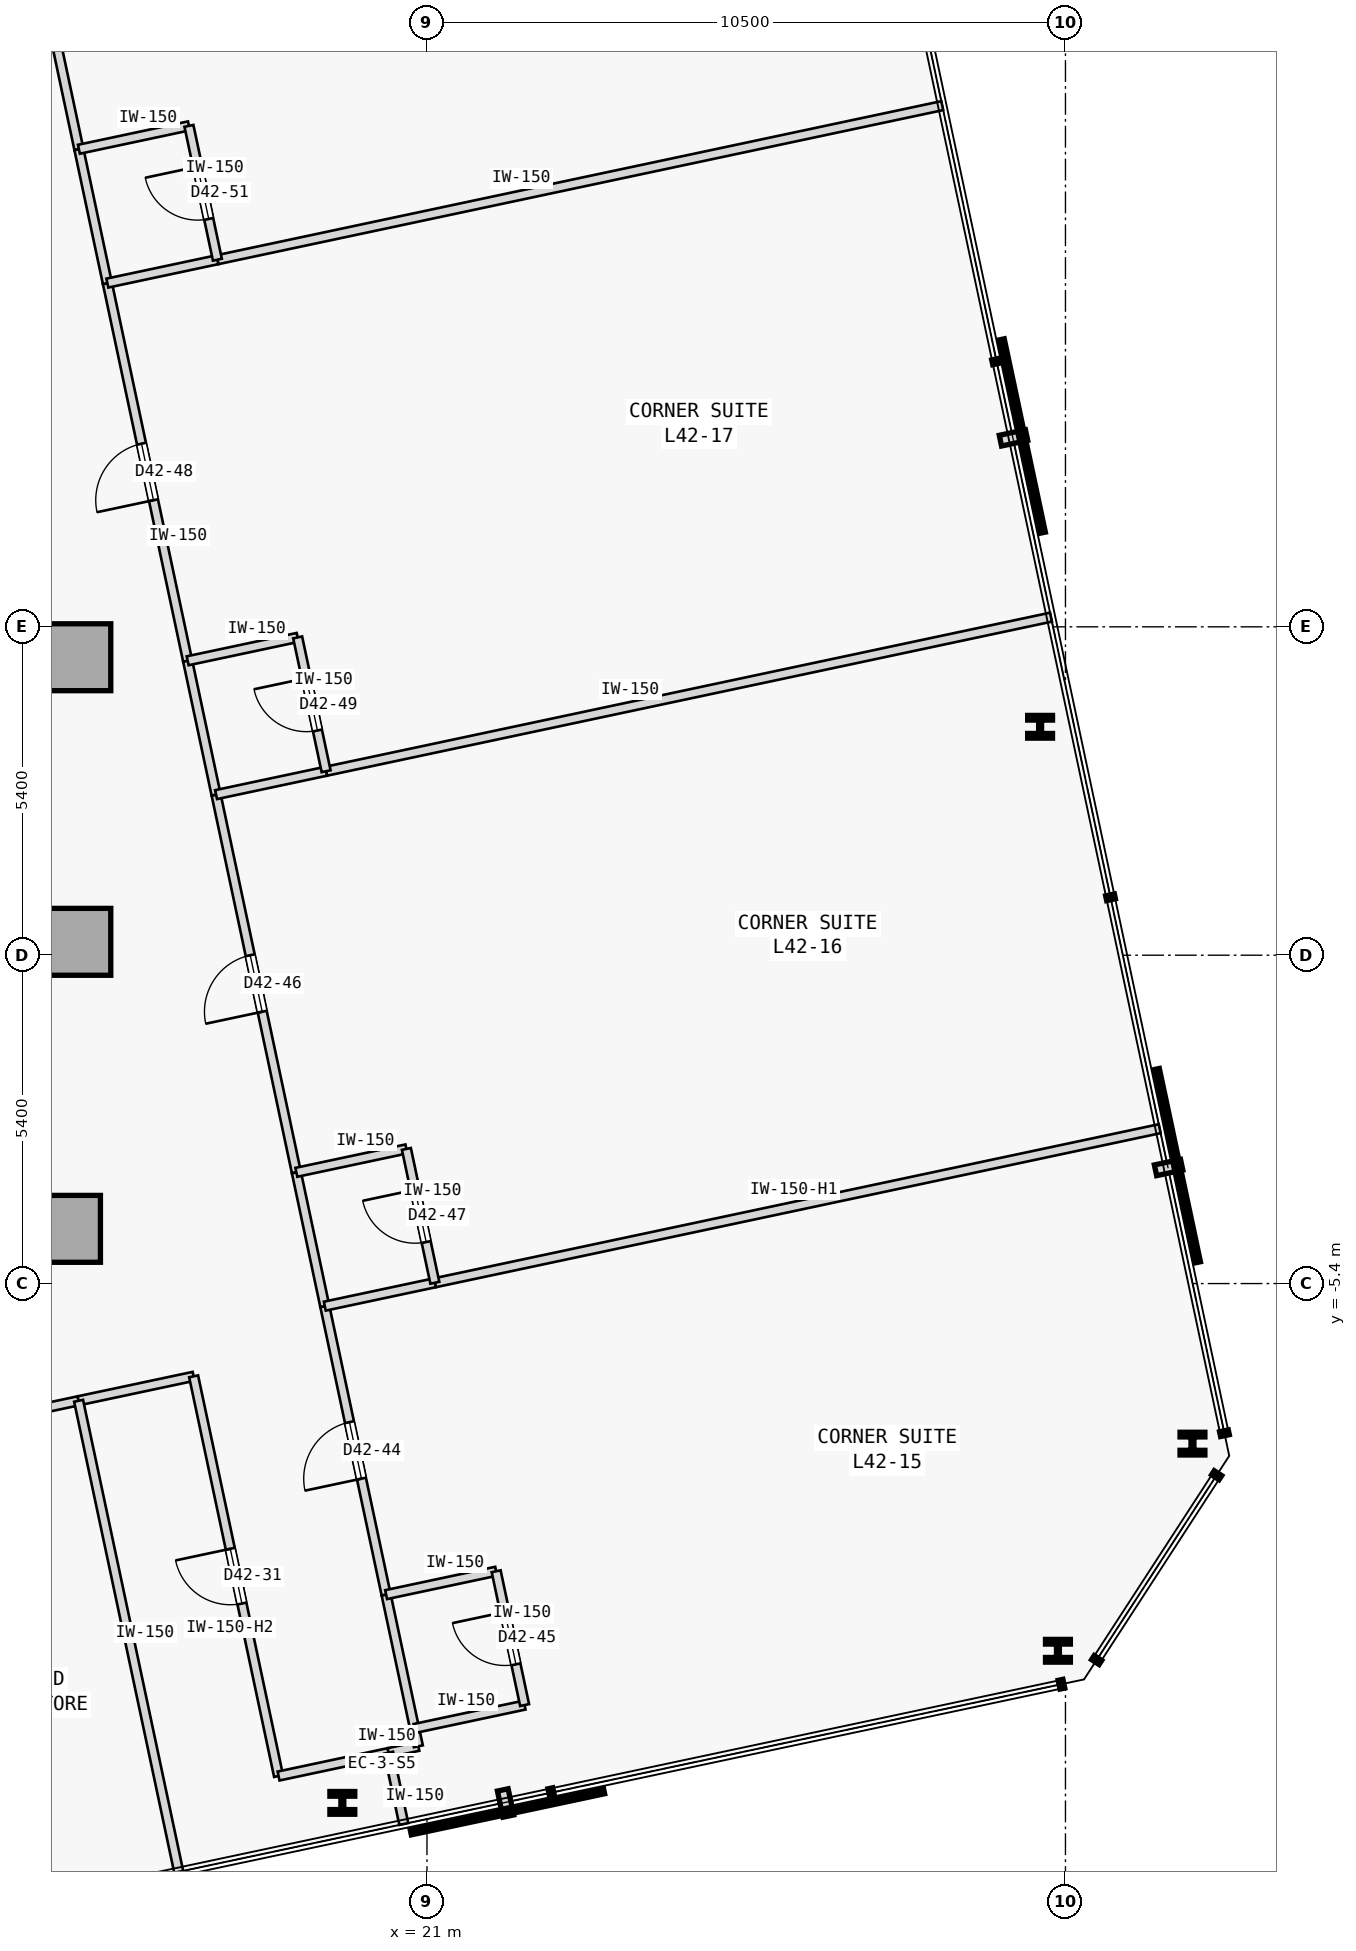
"""IFC4 building model, lengths in metres.
Left out: names, types, materials, properties, quantities, classifications, styles, units other than length and angle.
Written with IfcOpenShell. Run it as: python <this file> out.ifc"""

import sys

from ifc_helpers import new_model, si_unit, direction, frame, frame_2d, origin, origin_2d, place, context, subcontext, project, spatial, rectangle, i_section, extrude, element, fill, save


model = new_model("IFC4")
c1 = context("Model", 3, precision=1e-05, world=origin(), true_north=direction((0.0, 1.0)))
c2 = subcontext(c1, "Body", "Model", "MODEL_VIEW")
j1 = project(units=[si_unit("LENGTHUNIT", "METRE"), si_unit("PLANEANGLEUNIT", "RADIAN")], contexts=[c1])
p1 = place(None, origin())
s1 = spatial("IfcSite", under=j1, at=p1, CompositionType="ELEMENT")
p2 = place(p1, origin())
s2 = spatial("IfcBuilding", under=s1, at=p2, CompositionType="ELEMENT")
p3 = place(p2, frame((0.0, 0.0, 165.0)))
s3 = spatial("IfcBuildingStorey", under=s2, at=p3, CompositionType="ELEMENT", Elevation=165.0)
for number, where, z_axis, x_axis in (
    (1, (15.25, 4.9, 0.0), (0.0, 0.0, 1.0), (1.0, 0.0, 0.0)),
    (2, (15.25, 0.22, 0.0), (0.0, 0.0, 1.0), (1.0, 0.0, 0.0)),
    (3, (15.08, -4.5, 0.0), (0.0, 0.0, 1.0), (1.0, 0.0, 0.0)),
):
    element("IfcColumn", number, at=place(p3, frame(where, z_axis=z_axis, x_axis=x_axis)), inside=s3, PredefinedType="COLUMN", context=c2, shape_type="SweptSolid", body=[
        extrude(rectangle(XDim=1.1, YDim=1.1, at=origin_2d()), origin(), (0.0, 0.0, 1.0), 3.4),
    ])
for number, where, z_axis, x_axis in (
    (4, (19.608, -13.94, 0.0), (0.0, 0.0, 1.0), (1.0, 0.0, 0.0)),
    (5, (31.376, -11.439, 0.0), (0.0, 0.0, 1.0), (1.0, 0.0, 0.0)),
    (6, (33.589, -8.032, 0.0), (0.0, 0.0, 1.0), (1.0, 0.0, 0.0)),
    (7, (31.083, 3.756, 0.0), (0.0, 0.0, 1.0), (1.0, 0.0, 0.0)),
):
    element("IfcColumn", number, at=place(p3, frame(where, z_axis=z_axis, x_axis=x_axis)), inside=s3, PredefinedType="COLUMN", context=c2, shape_type="SweptSolid", body=[
        extrude(i_section(OverallWidth=0.409, OverallDepth=0.374, WebThickness=0.048, FlangeThickness=0.077, FilletRadius=0.015, at=origin_2d()), origin(), (0.0, 0.0, 1.0), 3.4),
    ])
p4 = place(p3, frame((11.234, -8.185, 0.0), z_axis=(0.0, 0.0, 1.0), x_axis=(0.978155092113, 0.207876443525, 0.0)))
e8 = element("IfcWall", 8, at=p4, inside=s3, PredefinedType="PARTITIONING", context=c2, shape_type="SweptSolid", body=[
    extrude(rectangle(XDim=4.127, YDim=0.15, at=frame_2d((2.063, 0.0))), origin(), (0.0, 0.0, 1.0), 3.175),
])
p5 = place(p4, frame((1.604, 0.0, 0.0)))
e9 = element("IfcOpeningElement", 9, at=p5, cuts=e8, PredefinedType="OPENING", context=c2, shape_type="SweptSolid", body=[
    extrude(rectangle(XDim=0.92, YDim=2.15, at=frame_2d((0.46, 1.075))), frame((0.0, 0.085, 0.0), z_axis=(0.0, -1.0, 0.0), x_axis=(1.0, 0.0, 0.0)), (0.0, 0.0, 1.0), 0.17),
])
p6 = place(p3, frame((15.271, -7.327, 0.0), z_axis=(0.0, 0.0, 1.0), x_axis=(0.978150188204, 0.207899517354, 0.0)))
e10 = element("IfcWall", 10, at=p6, inside=s3, PredefinedType="PARTITIONING", context=c2, shape_type="SweptSolid", body=[
    extrude(rectangle(XDim=1.934, YDim=0.15, at=frame_2d((0.967, 0.0))), origin(), (0.0, 0.0, 1.0), 3.175),
])
p7 = place(p3, frame((18.56, -13.498, 0.0), z_axis=(0.0, 0.0, 1.0), x_axis=(-0.207888737749, 0.978152479278, 0.0)))
e11 = element("IfcWall", 11, at=p7, inside=s3, PredefinedType="PARTITIONING", context=c2, shape_type="SweptSolid", body=[
    extrude(rectangle(XDim=6.72, YDim=0.15, at=frame_2d((3.36, 0.0))), origin(), (0.0, 0.0, 1.0), 2.575),
])
p8 = place(p7, frame((2.9, 0.0, 0.0)))
e12 = element("IfcOpeningElement", 12, at=p8, cuts=e11, PredefinedType="OPENING", context=c2, shape_type="SweptSolid", body=[
    extrude(rectangle(XDim=0.92, YDim=2.15, at=frame_2d((0.46, 1.075))), frame((0.0, 0.085, 0.0), z_axis=(0.0, -1.0, 0.0), x_axis=(1.0, 0.0, 0.0)), (0.0, 0.0, 1.0), 0.17),
])
p9 = place(p3, frame((18.56, -13.498, 0.0), z_axis=(0.0, 0.0, 1.0), x_axis=(0.978160192495, 0.207852442415, 0.0)))
e13 = element("IfcWall", 13, at=p9, inside=s3, PredefinedType="PARTITIONING", context=c2, shape_type="SweptSolid", body=[
    extrude(rectangle(XDim=1.85, YDim=0.15, at=frame_2d((0.925, 0.0))), origin(), (0.0, 0.0, 1.0), 3.175),
])
p10 = place(p3, frame((20.369, -13.114, 0.0), z_axis=(0.0, 0.0, 1.0), x_axis=(0.978143962546, 0.207928806409, 0.0)))
e14 = element("IfcWall", 14, at=p10, inside=s3, PredefinedType="PARTITIONING", context=c2, shape_type="SweptSolid", body=[
    extrude(rectangle(XDim=0.5, YDim=0.15, at=frame_2d((0.25, 0.0))), origin(), (0.0, 0.0, 1.0), 3.175),
])
p11 = place(p3, frame((20.858, -13.01, 0.0), z_axis=(0.0, 0.0, 1.0), x_axis=(-0.208306395052, 0.978063620518, 0.0)))
e15 = element("IfcWall", 15, at=p11, inside=s3, PredefinedType="PARTITIONING", context=c2, shape_type="SweptSolid", body=[
    extrude(rectangle(XDim=0.3, YDim=0.15, at=frame_2d((0.15, 0.0))), origin(), (0.0, 0.0, 1.0), 3.175),
])
p12 = place(p3, frame((20.328, -10.515, 0.0), z_axis=(0.0, 0.0, 1.0), x_axis=(-0.207950868925, 0.97813927235, 0.0)))
e16 = element("IfcWall", 16, at=p12, inside=s3, PredefinedType="PARTITIONING", context=c2, shape_type="SweptSolid", body=[
    extrude(rectangle(XDim=4.85, YDim=0.15, at=frame_2d((2.425, 0.0))), origin(), (0.0, 0.0, 1.0), 3.175),
])
p13 = place(p12, frame((1.95, 0.0, 0.0)))
e17 = element("IfcOpeningElement", 17, at=p13, cuts=e16, PredefinedType="OPENING", context=c2, shape_type="SweptSolid", body=[
    extrude(rectangle(XDim=0.95, YDim=2.15, at=frame_2d((0.475, 1.075))), frame((0.0, 0.085, 0.0), z_axis=(0.0, -1.0, 0.0), x_axis=(1.0, 0.0, 0.0)), (0.0, 0.0, 1.0), 0.17),
])
p14 = place(p3, frame((20.796, -12.716, 0.0), z_axis=(0.0, 0.0, 1.0), x_axis=(-0.207891197838, 0.978151956427, 0.0)))
e18 = element("IfcWall", 18, at=p14, inside=s3, PredefinedType="PARTITIONING", context=c2, shape_type="SweptSolid", body=[
    extrude(rectangle(XDim=2.25, YDim=0.15, at=frame_2d((1.125, 0.0))), origin(), (0.0, 0.0, 1.0), 3.175),
])
p15 = place(p3, frame((18.852, -3.571, 0.0), z_axis=(0.0, 0.0, 1.0), x_axis=(-0.207879907349, 0.978154355979, 0.0)))
e19 = element("IfcWall", 19, at=p15, inside=s3, PredefinedType="PARTITIONING", context=c2, shape_type="SweptSolid", body=[
    extrude(rectangle(XDim=6.35, YDim=0.15, at=frame_2d((3.175, 0.0))), origin(), (0.0, 0.0, 1.0), 3.175),
])
p16 = place(p15, frame((2.7, 0.0, 0.0)))
e20 = element("IfcOpeningElement", 20, at=p16, cuts=e19, PredefinedType="OPENING", context=c2, shape_type="SweptSolid", body=[
    extrude(rectangle(XDim=0.95, YDim=2.15, at=frame_2d((0.475, 1.075))), frame((0.0, 0.085, 0.0), z_axis=(0.0, -1.0, 0.0), x_axis=(1.0, 0.0, 0.0)), (0.0, 0.0, 1.0), 0.17),
])
p17 = place(p3, frame((19.32, -5.771, 0.0), z_axis=(0.0, 0.0, 1.0), x_axis=(-0.207913264065, 0.978147266328, 0.0)))
e21 = element("IfcWall", 21, at=p17, inside=s3, PredefinedType="PARTITIONING", context=c2, shape_type="SweptSolid", body=[
    extrude(rectangle(XDim=2.25, YDim=0.15, at=frame_2d((1.125, 0.0))), origin(), (0.0, 0.0, 1.0), 3.175),
])
p18 = place(p3, frame((17.064, 4.841, 0.0), z_axis=(0.0, 0.0, 1.0), x_axis=(-0.207924511115, 0.978144875608, 0.0)))
e22 = element("IfcWall", 22, at=p18, inside=s3, PredefinedType="PARTITIONING", context=c2, shape_type="SweptSolid", body=[
    extrude(rectangle(XDim=6.35, YDim=0.15, at=frame_2d((3.175, 0.0))), origin(), (0.0, 0.0, 1.0), 3.175),
])
p19 = place(p18, frame((2.7, 0.0, 0.0)))
e23 = element("IfcOpeningElement", 23, at=p19, cuts=e22, PredefinedType="OPENING", context=c2, shape_type="SweptSolid", body=[
    extrude(rectangle(XDim=0.95, YDim=2.15, at=frame_2d((0.475, 1.075))), frame((0.0, 0.085, 0.0), z_axis=(0.0, -1.0, 0.0), x_axis=(1.0, 0.0, 0.0)), (0.0, 0.0, 1.0), 0.17),
])
p20 = place(p3, frame((17.532, 2.641, 0.0), z_axis=(0.0, 0.0, 1.0), x_axis=(-0.207913264065, 0.978147266328, 0.0)))
e24 = element("IfcWall", 24, at=p20, inside=s3, PredefinedType="PARTITIONING", context=c2, shape_type="SweptSolid", body=[
    extrude(rectangle(XDim=2.25, YDim=0.15, at=frame_2d((1.125, 0.0))), origin(), (0.0, 0.0, 1.0), 3.175),
])
p21 = place(p3, frame((15.276, 13.253, 0.0), z_axis=(0.0, 0.0, 1.0), x_axis=(-0.207924511115, 0.978144875608, 0.0)))
e25 = element("IfcWall", 25, at=p21, inside=s3, PredefinedType="PARTITIONING", context=c2, shape_type="SweptSolid", body=[
    extrude(rectangle(XDim=6.35, YDim=0.15, at=frame_2d((3.175, 0.0))), origin(), (0.0, 0.0, 1.0), 3.175),
])
p22 = place(p21, frame((2.7, 0.0, 0.0)))
e26 = element("IfcOpeningElement", 26, at=p22, cuts=e25, PredefinedType="OPENING", context=c2, shape_type="SweptSolid", body=[
    extrude(rectangle(XDim=0.95, YDim=2.15, at=frame_2d((0.475, 1.075))), frame((0.0, 0.085, 0.0), z_axis=(0.0, -1.0, 0.0), x_axis=(1.0, 0.0, 0.0)), (0.0, 0.0, 1.0), 0.17),
])
p23 = place(p3, frame((15.744, 11.052, 0.0), z_axis=(0.0, 0.0, 1.0), x_axis=(-0.207891197838, 0.978151956427, 0.0)))
e27 = element("IfcWall", 27, at=p23, inside=s3, PredefinedType="PARTITIONING", context=c2, shape_type="SweptSolid", body=[
    extrude(rectangle(XDim=2.25, YDim=0.15, at=frame_2d((1.125, 0.0))), origin(), (0.0, 0.0, 1.0), 3.175),
])
p24 = place(p3, frame((16.917, -15.074, 0.0), z_axis=(0.0, 0.0, 1.0), x_axis=(-0.207922536845, 0.978145295277, 0.0)))
e28 = element("IfcWall", 28, at=p24, inside=s3, PredefinedType="PARTITIONING", context=c2, shape_type="SweptSolid", body=[
    extrude(rectangle(XDim=7.92, YDim=0.15, at=frame_2d((3.96, 0.0))), origin(), (0.0, 0.0, 1.0), 3.175),
])
p25 = place(p3, frame((20.619, -14.288, 0.0), z_axis=(0.0, 0.0, 1.0), x_axis=(-0.207917150959, 0.978146440129, 0.0)))
e29 = element("IfcWall", 29, at=p25, inside=s3, PredefinedType="PARTITIONING", context=c2, shape_type="SweptSolid", body=[
    extrude(rectangle(XDim=1.2, YDim=0.15, at=frame_2d((0.6, 0.0))), origin(), (0.0, 0.0, 1.0), 3.175),
])
for number, where, z_axis, x_axis in (
    (30, (20.796, -12.716, 0.0), (0.0, 0.0, 1.0), (0.978, 0.208, 0.0)),
    (31, (20.328, -10.515, 0.0), (0.0, 0.0, 1.0), (0.978, 0.208, 0.0)),
):
    element("IfcWall", number, at=place(p3, frame(where, z_axis=z_axis, x_axis=x_axis)), inside=s3, PredefinedType="PARTITIONING", context=c2, shape_type="SweptSolid", body=[
        extrude(rectangle(XDim=1.85, YDim=0.15, at=frame_2d((0.925, 0.0))), origin(), (0.0, 0.0, 1.0), 3.175),
    ])
p26 = place(p3, frame((22.605, -12.332, 0.0), z_axis=(0.0, 0.0, 1.0), x_axis=(-0.207891197838, 0.978151956427, 0.0)))
e32 = element("IfcWall", 32, at=p26, inside=s3, PredefinedType="PARTITIONING", context=c2, shape_type="SweptSolid", body=[
    extrude(rectangle(XDim=2.25, YDim=0.15, at=frame_2d((1.125, 0.0))), origin(), (0.0, 0.0, 1.0), 3.175),
])
p27 = place(p26, frame((0.685, 0.0, 0.0)))
e33 = element("IfcOpeningElement", 33, at=p27, cuts=e32, PredefinedType="OPENING", context=c2, shape_type="SweptSolid", body=[
    extrude(rectangle(XDim=0.88, YDim=2.15, at=frame_2d((0.44, 1.075))), frame((0.0, 0.085, 0.0), z_axis=(0.0, -1.0, 0.0), x_axis=(1.0, 0.0, 0.0)), (0.0, 0.0, 1.0), 0.17),
])
p28 = place(p3, frame((21.129, -5.387, 0.0), z_axis=(0.0, 0.0, 1.0), x_axis=(0.97814556055, 0.207921288896, 0.0)))
e34 = element("IfcWall", 34, at=p28, inside=s3, PredefinedType="PARTITIONING", context=c2, shape_type="SweptSolid", body=[
    extrude(rectangle(XDim=12.187, YDim=0.15, at=frame_2d((6.094, 0.0))), origin(), (0.0, 0.0, 1.0), 2.725),
])
p29 = place(p3, frame((19.32, -5.771, 0.0), z_axis=(0.0, 0.0, 1.0), x_axis=(0.978165892835, 0.207825614625, 0.0)))
e35 = element("IfcWall", 35, at=p29, inside=s3, PredefinedType="PARTITIONING", context=c2, shape_type="SweptSolid", body=[
    extrude(rectangle(XDim=1.85, YDim=0.15, at=frame_2d((0.925, 0.0))), origin(), (0.0, 0.0, 1.0), 3.175),
])
p30 = place(p3, frame((18.852, -3.571, 0.0), z_axis=(0.0, 0.0, 1.0), x_axis=(0.978139061018, 0.207951862966, 0.0)))
e36 = element("IfcWall", 36, at=p30, inside=s3, PredefinedType="PARTITIONING", context=c2, shape_type="SweptSolid", body=[
    extrude(rectangle(XDim=1.85, YDim=0.15, at=frame_2d((0.925, 0.0))), origin(), (0.0, 0.0, 1.0), 3.175),
])
p31 = place(p3, frame((21.129, -5.387, 0.0), z_axis=(0.0, 0.0, 1.0), x_axis=(-0.207891197838, 0.978151956427, 0.0)))
e37 = element("IfcWall", 37, at=p31, inside=s3, PredefinedType="PARTITIONING", context=c2, shape_type="SweptSolid", body=[
    extrude(rectangle(XDim=2.25, YDim=0.15, at=frame_2d((1.125, 0.0))), origin(), (0.0, 0.0, 1.0), 3.175),
])
p32 = place(p31, frame((0.685, 0.0, 0.0)))
e38 = element("IfcOpeningElement", 38, at=p32, cuts=e37, PredefinedType="OPENING", context=c2, shape_type="SweptSolid", body=[
    extrude(rectangle(XDim=0.88, YDim=2.15, at=frame_2d((0.44, 1.075))), frame((0.0, 0.085, 0.0), z_axis=(0.0, -1.0, 0.0), x_axis=(1.0, 0.0, 0.0)), (0.0, 0.0, 1.0), 0.17),
])
p33 = place(p3, frame((19.341, 3.025, 0.0), z_axis=(0.0, 0.0, 1.0), x_axis=(0.97814556055, 0.207921288896, 0.0)))
e39 = element("IfcWall", 39, at=p33, inside=s3, PredefinedType="PARTITIONING", context=c2, shape_type="SweptSolid", body=[
    extrude(rectangle(XDim=12.187, YDim=0.15, at=frame_2d((6.094, 0.0))), origin(), (0.0, 0.0, 1.0), 3.175),
])
p34 = place(p3, frame((17.532, 2.641, 0.0), z_axis=(0.0, 0.0, 1.0), x_axis=(0.978160192495, 0.207852442415, 0.0)))
e40 = element("IfcWall", 40, at=p34, inside=s3, PredefinedType="PARTITIONING", context=c2, shape_type="SweptSolid", body=[
    extrude(rectangle(XDim=1.85, YDim=0.15, at=frame_2d((0.925, 0.0))), origin(), (0.0, 0.0, 1.0), 3.175),
])
p35 = place(p3, frame((17.064, 4.841, 0.0), z_axis=(0.0, 0.0, 1.0), x_axis=(0.978133353907, 0.20797870558, 0.0)))
e41 = element("IfcWall", 41, at=p35, inside=s3, PredefinedType="PARTITIONING", context=c2, shape_type="SweptSolid", body=[
    extrude(rectangle(XDim=1.85, YDim=0.15, at=frame_2d((0.925, 0.0))), origin(), (0.0, 0.0, 1.0), 3.175),
])
p36 = place(p3, frame((19.341, 3.025, 0.0), z_axis=(0.0, 0.0, 1.0), x_axis=(-0.207891197838, 0.978151956427, 0.0)))
e42 = element("IfcWall", 42, at=p36, inside=s3, PredefinedType="PARTITIONING", context=c2, shape_type="SweptSolid", body=[
    extrude(rectangle(XDim=2.25, YDim=0.15, at=frame_2d((1.125, 0.0))), origin(), (0.0, 0.0, 1.0), 3.175),
])
p37 = place(p36, frame((0.685, 0.0, 0.0)))
e43 = element("IfcOpeningElement", 43, at=p37, cuts=e42, PredefinedType="OPENING", context=c2, shape_type="SweptSolid", body=[
    extrude(rectangle(XDim=0.88, YDim=2.15, at=frame_2d((0.44, 1.075))), frame((0.0, 0.085, 0.0), z_axis=(0.0, -1.0, 0.0), x_axis=(1.0, 0.0, 0.0)), (0.0, 0.0, 1.0), 0.17),
])
p38 = place(p3, frame((17.553, 11.437, 0.0), z_axis=(0.0, 0.0, 1.0), x_axis=(0.97814556055, 0.207921288896, 0.0)))
e44 = element("IfcWall", 44, at=p38, inside=s3, PredefinedType="PARTITIONING", context=c2, shape_type="SweptSolid", body=[
    extrude(rectangle(XDim=12.187, YDim=0.15, at=frame_2d((6.094, 0.0))), origin(), (0.0, 0.0, 1.0), 3.175),
])
for number, where, z_axis, x_axis in (
    (45, (15.744, 11.052, 0.0), (0.0, 0.0, 1.0), (0.978, 0.208, 0.0)),
    (46, (15.276, 13.253, 0.0), (0.0, 0.0, 1.0), (0.978, 0.208, 0.0)),
):
    element("IfcWall", number, at=place(p3, frame(where, z_axis=z_axis, x_axis=x_axis)), inside=s3, PredefinedType="PARTITIONING", context=c2, shape_type="SweptSolid", body=[
        extrude(rectangle(XDim=1.85, YDim=0.15, at=frame_2d((0.925, 0.0))), origin(), (0.0, 0.0, 1.0), 3.175),
    ])
p39 = place(p3, frame((17.553, 11.437, 0.0), z_axis=(0.0, 0.0, 1.0), x_axis=(-0.207891197838, 0.978151956427, 0.0)))
e47 = element("IfcWall", 47, at=p39, inside=s3, PredefinedType="PARTITIONING", context=c2, shape_type="SweptSolid", body=[
    extrude(rectangle(XDim=2.25, YDim=0.15, at=frame_2d((1.125, 0.0))), origin(), (0.0, 0.0, 1.0), 3.175),
])
p40 = place(p39, frame((0.685, 0.0, 0.0)))
e48 = element("IfcOpeningElement", 48, at=p40, cuts=e47, PredefinedType="OPENING", context=c2, shape_type="SweptSolid", body=[
    extrude(rectangle(XDim=0.88, YDim=2.15, at=frame_2d((0.44, 1.075))), frame((0.0, 0.085, 0.0), z_axis=(0.0, -1.0, 0.0), x_axis=(1.0, 0.0, 0.0)), (0.0, 0.0, 1.0), 0.17),
])
p41 = place(p8, origin())
e49 = element("IfcDoor", 49, at=p41, inside=s3, OperationType="SINGLE_SWING_RIGHT", PredefinedType="DOOR", context=c2, shape_type="SweptSolid", body=[
    extrude(rectangle(XDim=0.92, YDim=2.15, at=frame_2d((0.46, 1.075))), frame((0.0, 0.025, 0.0), z_axis=(0.0, -1.0, 0.0), x_axis=(1.0, 0.0, 0.0)), (0.0, 0.0, 1.0), 0.05),
])
fill(e12, e49)
p42 = place(p13, origin())
e50 = element("IfcDoor", 50, at=p42, inside=s3, OperationType="SINGLE_SWING_LEFT", PredefinedType="DOOR", context=c2, shape_type="SweptSolid", body=[
    extrude(rectangle(XDim=0.95, YDim=2.15, at=frame_2d((0.475, 1.075))), frame((0.0, 0.025, 0.0), z_axis=(0.0, -1.0, 0.0), x_axis=(1.0, 0.0, 0.0)), (0.0, 0.0, 1.0), 0.05),
])
fill(e17, e50)
p43 = place(p27, origin())
e51 = element("IfcDoor", 51, at=p43, inside=s3, OperationType="SINGLE_SWING_RIGHT", PredefinedType="DOOR", context=c2, shape_type="SweptSolid", body=[
    extrude(rectangle(XDim=0.88, YDim=2.15, at=frame_2d((0.44, 1.075))), frame((0.0, 0.025, 0.0), z_axis=(0.0, -1.0, 0.0), x_axis=(1.0, 0.0, 0.0)), (0.0, 0.0, 1.0), 0.05),
])
fill(e33, e51)
p44 = place(p16, origin())
e52 = element("IfcDoor", 52, at=p44, inside=s3, OperationType="SINGLE_SWING_LEFT", PredefinedType="DOOR", context=c2, shape_type="SweptSolid", body=[
    extrude(rectangle(XDim=0.95, YDim=2.15, at=frame_2d((0.475, 1.075))), frame((0.0, 0.025, 0.0), z_axis=(0.0, -1.0, 0.0), x_axis=(1.0, 0.0, 0.0)), (0.0, 0.0, 1.0), 0.05),
])
fill(e20, e52)
p45 = place(p32, origin())
e53 = element("IfcDoor", 53, at=p45, inside=s3, OperationType="SINGLE_SWING_RIGHT", PredefinedType="DOOR", context=c2, shape_type="SweptSolid", body=[
    extrude(rectangle(XDim=0.88, YDim=2.15, at=frame_2d((0.44, 1.075))), frame((0.0, 0.025, 0.0), z_axis=(0.0, -1.0, 0.0), x_axis=(1.0, 0.0, 0.0)), (0.0, 0.0, 1.0), 0.05),
])
fill(e38, e53)
p46 = place(p19, origin())
e54 = element("IfcDoor", 54, at=p46, inside=s3, OperationType="SINGLE_SWING_LEFT", PredefinedType="DOOR", context=c2, shape_type="SweptSolid", body=[
    extrude(rectangle(XDim=0.95, YDim=2.15, at=frame_2d((0.475, 1.075))), frame((0.0, 0.025, 0.0), z_axis=(0.0, -1.0, 0.0), x_axis=(1.0, 0.0, 0.0)), (0.0, 0.0, 1.0), 0.05),
])
fill(e23, e54)
p47 = place(p37, origin())
e55 = element("IfcDoor", 55, at=p47, inside=s3, OperationType="SINGLE_SWING_RIGHT", PredefinedType="DOOR", context=c2, shape_type="SweptSolid", body=[
    extrude(rectangle(XDim=0.88, YDim=2.15, at=frame_2d((0.44, 1.075))), frame((0.0, 0.025, 0.0), z_axis=(0.0, -1.0, 0.0), x_axis=(1.0, 0.0, 0.0)), (0.0, 0.0, 1.0), 0.05),
])
fill(e43, e55)
p48 = place(p40, origin())
e56 = element("IfcDoor", 56, at=p48, inside=s3, OperationType="SINGLE_SWING_RIGHT", PredefinedType="DOOR", context=c2, shape_type="SweptSolid", body=[
    extrude(rectangle(XDim=0.88, YDim=2.15, at=frame_2d((0.44, 1.075))), frame((0.0, 0.025, 0.0), z_axis=(0.0, -1.0, 0.0), x_axis=(1.0, 0.0, 0.0)), (0.0, 0.0, 1.0), 0.05),
])
fill(e48, e56)
save(model, sys.argv[1])
